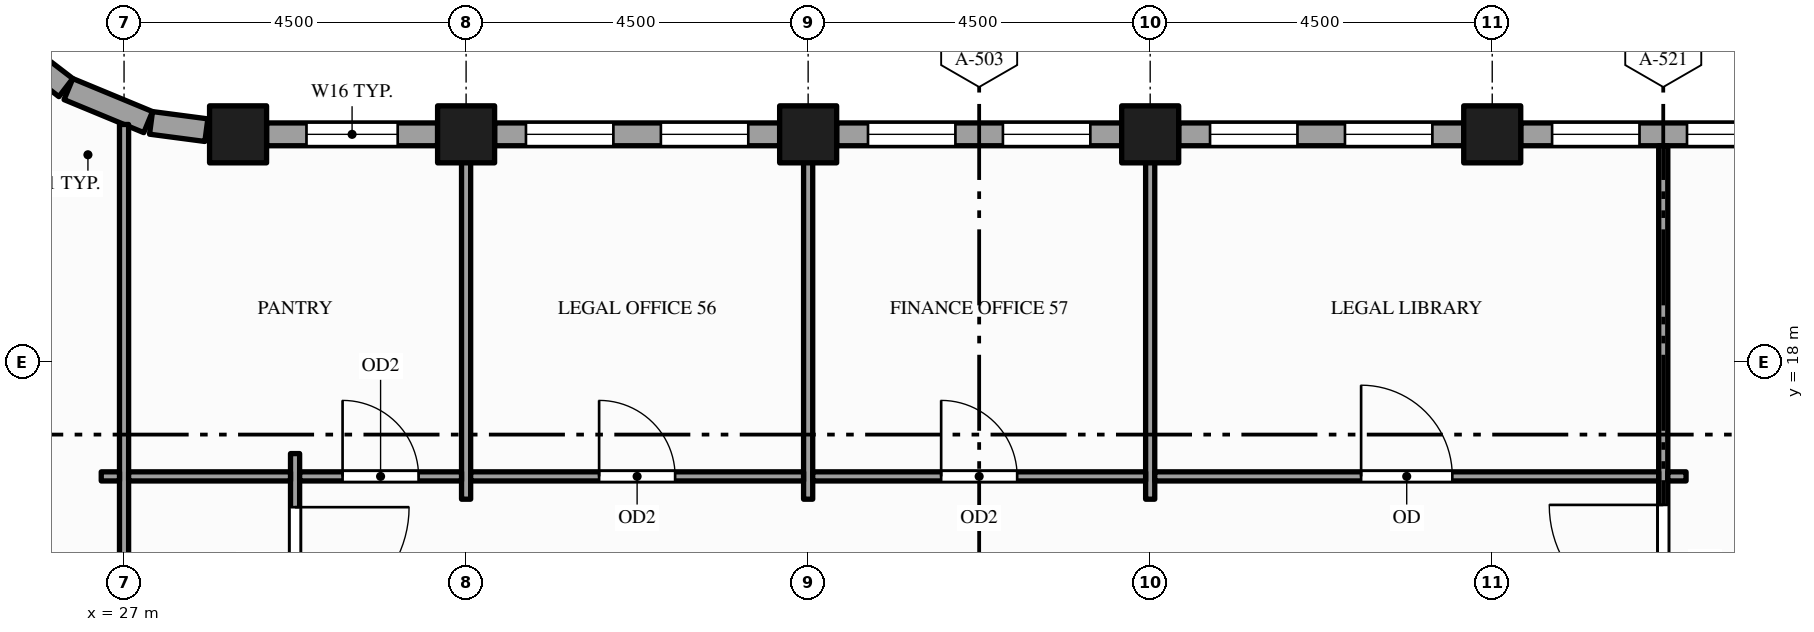
"""IFC4 building model, lengths in metres.
Left out: names, types, materials, properties, quantities, classifications, styles, units other than length and angle.
Written with IfcOpenShell. Run it as: python <this file> out.ifc"""

import sys

from ifc_helpers import new_model, si_unit, direction, frame, frame_2d, origin, origin_2d, place, context, subcontext, project, spatial, rectangle, hollow_rectangle, extrude, element, fill, save


model = new_model("IFC4")
c1 = context("Model", 3, precision=1e-05, world=origin(), true_north=direction((0.0, 1.0)))
c2 = subcontext(c1, "Body", "Model", "MODEL_VIEW")
j1 = project(units=[si_unit("LENGTHUNIT", "METRE"), si_unit("PLANEANGLEUNIT", "RADIAN")], contexts=[c1])
p1 = place(None, origin())
s1 = spatial("IfcSite", under=j1, at=p1, CompositionType="ELEMENT")
p2 = place(p1, origin())
s2 = spatial("IfcBuilding", under=s1, at=p2, CompositionType="ELEMENT")
p3 = place(p2, frame((0.0, 0.0, 227.0)))
s3 = spatial("IfcBuildingStorey", under=s2, at=p3, CompositionType="ELEMENT", Elevation=227.0)
for number, where, z_axis, x_axis in (
    (1, (28.5, 21.0, -0.15), (0.0, 0.0, 1.0), (1.0, 0.0, 0.0)),
    (2, (31.5, 21.0, -0.15), (0.0, 0.0, 1.0), (1.0, 0.0, 0.0)),
    (3, (36.0, 21.0, -0.15), (0.0, 0.0, 1.0), (1.0, 0.0, 0.0)),
    (4, (40.5, 21.0, -0.15), (0.0, 0.0, 1.0), (1.0, 0.0, 0.0)),
    (5, (45.0, 21.0, -0.15), (0.0, 0.0, 1.0), (1.0, 0.0, 0.0)),
):
    element("IfcColumn", number, at=place(p3, frame(where, z_axis=z_axis, x_axis=x_axis)), inside=s3, PredefinedType="COLUMN", context=c2, shape_type="SweptSolid", body=[
        extrude(hollow_rectangle(XDim=0.75, YDim=0.75, WallThickness=0.036, at=origin_2d()), origin(), (0.0, 0.0, 1.0), 4.0),
    ])
p4 = place(p3, frame((49.125, 21.0, 0.0), z_axis=(0.0, 0.0, 1.0), x_axis=(-1.0, 0.0, 0.0)))
e6 = element("IfcWall", 6, at=p4, inside=s3, PredefinedType="STANDARD", context=c2, shape_type="SweptSolid", body=[
    extrude(rectangle(XDim=3.75, YDim=0.3, at=frame_2d((1.875, 0.0))), origin(), (0.0, 0.0, 1.0), 2.87),
])
p5 = place(p4, frame((0.413, 0.0, 0.9)))
e7 = element("IfcOpeningElement", 7, at=p5, cuts=e6, PredefinedType="OPENING", context=c2, shape_type="SweptSolid", body=[
    extrude(rectangle(XDim=1.15, YDim=1.75, at=frame_2d((0.575, 0.875))), frame((0.0, 0.16, 0.0), z_axis=(0.0, -1.0, 0.0), x_axis=(1.0, 0.0, 0.0)), (0.0, 0.0, 1.0), 0.32),
])
p6 = place(p4, frame((2.188, 0.0, 0.9)))
e8 = element("IfcOpeningElement", 8, at=p6, cuts=e6, PredefinedType="OPENING", context=c2, shape_type="SweptSolid", body=[
    extrude(rectangle(XDim=1.15, YDim=1.75, at=frame_2d((0.575, 0.875))), frame((0.0, 0.16, 0.0), z_axis=(0.0, -1.0, 0.0), x_axis=(1.0, 0.0, 0.0)), (0.0, 0.0, 1.0), 0.32),
])
p7 = place(p3, frame((44.625, 21.0, 0.0), z_axis=(0.0, 0.0, 1.0), x_axis=(-1.0, 0.0, 0.0)))
e9 = element("IfcWall", 9, at=p7, inside=s3, PredefinedType="STANDARD", context=c2, shape_type="SweptSolid", body=[
    extrude(rectangle(XDim=3.75, YDim=0.3, at=frame_2d((1.875, 0.0))), origin(), (0.0, 0.0, 1.0), 2.87),
])
p8 = place(p7, frame((0.413, 0.0, 0.9)))
e10 = element("IfcOpeningElement", 10, at=p8, cuts=e9, PredefinedType="OPENING", context=c2, shape_type="SweptSolid", body=[
    extrude(rectangle(XDim=1.15, YDim=1.75, at=frame_2d((0.575, 0.875))), frame((0.0, 0.16, 0.0), z_axis=(0.0, -1.0, 0.0), x_axis=(1.0, 0.0, 0.0)), (0.0, 0.0, 1.0), 0.32),
])
p9 = place(p7, frame((2.188, 0.0, 0.9)))
e11 = element("IfcOpeningElement", 11, at=p9, cuts=e9, PredefinedType="OPENING", context=c2, shape_type="SweptSolid", body=[
    extrude(rectangle(XDim=1.15, YDim=1.75, at=frame_2d((0.575, 0.875))), frame((0.0, 0.16, 0.0), z_axis=(0.0, -1.0, 0.0), x_axis=(1.0, 0.0, 0.0)), (0.0, 0.0, 1.0), 0.32),
])
p10 = place(p3, frame((40.125, 21.0, 0.0), z_axis=(0.0, 0.0, 1.0), x_axis=(-1.0, 0.0, 0.0)))
e12 = element("IfcWall", 12, at=p10, inside=s3, PredefinedType="STANDARD", context=c2, shape_type="SweptSolid", body=[
    extrude(rectangle(XDim=3.75, YDim=0.3, at=frame_2d((1.875, 0.0))), origin(), (0.0, 0.0, 1.0), 2.87),
])
p11 = place(p10, frame((0.413, 0.0, 0.9)))
e13 = element("IfcOpeningElement", 13, at=p11, cuts=e12, PredefinedType="OPENING", context=c2, shape_type="SweptSolid", body=[
    extrude(rectangle(XDim=1.15, YDim=1.75, at=frame_2d((0.575, 0.875))), frame((0.0, 0.16, 0.0), z_axis=(0.0, -1.0, 0.0), x_axis=(1.0, 0.0, 0.0)), (0.0, 0.0, 1.0), 0.32),
])
p12 = place(p10, frame((2.188, 0.0, 0.9)))
e14 = element("IfcOpeningElement", 14, at=p12, cuts=e12, PredefinedType="OPENING", context=c2, shape_type="SweptSolid", body=[
    extrude(rectangle(XDim=1.15, YDim=1.75, at=frame_2d((0.575, 0.875))), frame((0.0, 0.16, 0.0), z_axis=(0.0, -1.0, 0.0), x_axis=(1.0, 0.0, 0.0)), (0.0, 0.0, 1.0), 0.32),
])
p13 = place(p3, frame((35.625, 21.0, 0.0), z_axis=(0.0, 0.0, 1.0), x_axis=(-1.0, 0.0, 0.0)))
e15 = element("IfcWall", 15, at=p13, inside=s3, PredefinedType="STANDARD", context=c2, shape_type="SweptSolid", body=[
    extrude(rectangle(XDim=3.75, YDim=0.3, at=frame_2d((1.875, 0.0))), origin(), (0.0, 0.0, 1.0), 2.87),
])
p14 = place(p13, frame((0.413, 0.0, 0.9)))
e16 = element("IfcOpeningElement", 16, at=p14, cuts=e15, PredefinedType="OPENING", context=c2, shape_type="SweptSolid", body=[
    extrude(rectangle(XDim=1.15, YDim=1.75, at=frame_2d((0.575, 0.875))), frame((0.0, 0.16, 0.0), z_axis=(0.0, -1.0, 0.0), x_axis=(1.0, 0.0, 0.0)), (0.0, 0.0, 1.0), 0.32),
])
p15 = place(p13, frame((2.188, 0.0, 0.9)))
e17 = element("IfcOpeningElement", 17, at=p15, cuts=e15, PredefinedType="OPENING", context=c2, shape_type="SweptSolid", body=[
    extrude(rectangle(XDim=1.15, YDim=1.75, at=frame_2d((0.575, 0.875))), frame((0.0, 0.16, 0.0), z_axis=(0.0, -1.0, 0.0), x_axis=(1.0, 0.0, 0.0)), (0.0, 0.0, 1.0), 0.32),
])
p16 = place(p3, frame((31.125, 21.0, 0.0), z_axis=(0.0, 0.0, 1.0), x_axis=(-1.0, 0.0, 0.0)))
e18 = element("IfcWall", 18, at=p16, inside=s3, PredefinedType="STANDARD", context=c2, shape_type="SweptSolid", body=[
    extrude(rectangle(XDim=2.25, YDim=0.3, at=frame_2d((1.125, 0.0))), origin(), (0.0, 0.0, 1.0), 2.87),
])
p17 = place(p16, frame((0.525, 0.0, 0.9)))
e19 = element("IfcOpeningElement", 19, at=p17, cuts=e18, PredefinedType="OPENING", context=c2, shape_type="SweptSolid", body=[
    extrude(rectangle(XDim=1.2, YDim=1.75, at=frame_2d((0.6, 0.875))), frame((0.0, 0.16, 0.0), z_axis=(0.0, -1.0, 0.0), x_axis=(1.0, 0.0, 0.0)), (0.0, 0.0, 1.0), 0.32),
])
p18 = place(p3, frame((28.083, 21.055, 0.0), z_axis=(0.0, 0.0, 1.0), x_axis=(-0.99142711513, 0.130660917588, 0.0)))
e20 = element("IfcWall", 20, at=p18, inside=s3, PredefinedType="STANDARD", context=c2, shape_type="SweptSolid", body=[
    extrude(rectangle(XDim=0.734, YDim=0.3, at=frame_2d((0.367, 0.0))), origin(), (0.0, 0.0, 1.0), 3.157),
])
p19 = place(p3, frame((27.317, 21.161, 0.0), z_axis=(0.0, 0.0, 1.0), x_axis=(-0.923914616768, 0.382598720491, 0.0)))
e21 = element("IfcWall", 21, at=p19, inside=s3, PredefinedType="STANDARD", context=c2, shape_type="SweptSolid", body=[
    extrude(rectangle(XDim=1.135, YDim=0.3, at=frame_2d((0.568, 0.0))), origin(), (0.0, 0.0, 1.0), 2.87),
])
p20 = place(p3, frame((26.234, 21.615, 0.0), z_axis=(0.0, 0.0, 1.0), x_axis=(-0.793575131083, 0.608472276547, 0.0)))
e22 = element("IfcWall", 22, at=p20, inside=s3, PredefinedType="STANDARD", context=c2, shape_type="SweptSolid", body=[
    extrude(rectangle(XDim=0.629, YDim=0.3, at=frame_2d((0.314, 0.0))), origin(), (0.0, 0.0, 1.0), 3.157),
])
p21 = place(p3, frame((27.0, -1.35, 0.0), z_axis=(0.0, 0.0, 1.0), x_axis=(0.0, 1.0, 0.0)))
e23 = element("IfcWall", 23, at=p21, inside=s3, PredefinedType="PARTITIONING", context=c2, shape_type="SweptSolid", body=[
    extrude(rectangle(XDim=22.48, YDim=0.12, at=frame_2d((11.24, 0.0))), origin(), (0.0, 0.0, 1.0), 2.87),
])
p22 = place(p21, frame((10.725, 0.0, 0.0)))
e24 = element("IfcOpeningElement", 24, at=p22, cuts=e23, PredefinedType="OPENING", context=c2, shape_type="SweptSolid", body=[
    extrude(rectangle(XDim=1.5, YDim=2.1, at=frame_2d((0.75, 1.05))), frame((0.0, 0.07, 0.0), z_axis=(0.0, -1.0, 0.0), x_axis=(1.0, 0.0, 0.0)), (0.0, 0.0, 1.0), 0.14),
])
p23 = place(p21, frame((14.625, 0.0, 0.0)))
e25 = element("IfcOpeningElement", 25, at=p23, cuts=e23, PredefinedType="OPENING", context=c2, shape_type="SweptSolid", body=[
    extrude(rectangle(XDim=1.2, YDim=2.1, at=frame_2d((0.6, 1.05))), frame((0.0, 0.07, 0.0), z_axis=(0.0, -1.0, 0.0), x_axis=(1.0, 0.0, 0.0)), (0.0, 0.0, 1.0), 0.14),
])
p24 = place(p3, frame((29.25, 2.7, 0.0), z_axis=(0.0, 0.0, 1.0), x_axis=(0.0, 1.0, 0.0)))
e26 = element("IfcWall", 26, at=p24, inside=s3, PredefinedType="PARTITIONING", context=c2, shape_type="SweptSolid", body=[
    extrude(rectangle(XDim=14.1, YDim=0.12, at=frame_2d((7.05, 0.0))), origin(), (0.0, 0.0, 1.0), 2.87),
])
p25 = place(p24, frame((0.705, 0.0, 0.0)))
e27 = element("IfcOpeningElement", 27, at=p25, cuts=e26, PredefinedType="OPENING", context=c2, shape_type="SweptSolid", body=[
    extrude(rectangle(XDim=1.5, YDim=2.1, at=frame_2d((0.75, 1.05))), frame((0.0, 0.07, 0.0), z_axis=(0.0, -1.0, 0.0), x_axis=(1.0, 0.0, 0.0)), (0.0, 0.0, 1.0), 0.14),
])
p26 = place(p24, frame((11.895, 0.0, 0.0)))
e28 = element("IfcOpeningElement", 28, at=p26, cuts=e26, PredefinedType="OPENING", context=c2, shape_type="SweptSolid", body=[
    extrude(rectangle(XDim=1.5, YDim=2.1, at=frame_2d((0.75, 1.05))), frame((0.0, 0.07, 0.0), z_axis=(0.0, -1.0, 0.0), x_axis=(1.0, 0.0, 0.0)), (0.0, 0.0, 1.0), 0.14),
])
for number, where, z_axis, x_axis in (
    (29, (31.5, 16.2, 0.0), (0.0, 0.0, 1.0), (0.0, 1.0, 0.0)),
    (30, (36.0, 16.2, 0.0), (0.0, 0.0, 1.0), (0.0, 1.0, 0.0)),
    (31, (40.5, 16.2, 0.0), (0.0, 0.0, 1.0), (0.0, 1.0, 0.0)),
):
    element("IfcWall", number, at=place(p3, frame(where, z_axis=z_axis, x_axis=x_axis)), inside=s3, PredefinedType="PARTITIONING", context=c2, shape_type="SweptSolid", body=[
        extrude(rectangle(XDim=4.65, YDim=0.12, at=frame_2d((2.325, 0.0))), origin(), (0.0, 0.0, 1.0), 2.87),
    ])
p27 = place(p3, frame((47.25, -1.35, 0.0), z_axis=(0.0, 0.0, 1.0), x_axis=(0.0, 1.0, 0.0)))
e32 = element("IfcWall", 32, at=p27, inside=s3, PredefinedType="PARTITIONING", context=c2, shape_type="SweptSolid", body=[
    extrude(rectangle(XDim=22.2, YDim=0.12, at=frame_2d((11.1, 0.0))), origin(), (0.0, 0.0, 1.0), 2.87),
])
p28 = place(p27, frame((4.725, 0.0, 0.0)))
e33 = element("IfcOpeningElement", 33, at=p28, cuts=e32, PredefinedType="OPENING", context=c2, shape_type="SweptSolid", body=[
    extrude(rectangle(XDim=1.5, YDim=2.1, at=frame_2d((0.75, 1.05))), frame((0.0, 0.07, 0.0), z_axis=(0.0, -1.0, 0.0), x_axis=(1.0, 0.0, 0.0)), (0.0, 0.0, 1.0), 0.14),
])
p29 = place(p27, frame((15.975, 0.0, 0.0)))
e34 = element("IfcOpeningElement", 34, at=p29, cuts=e32, PredefinedType="OPENING", context=c2, shape_type="SweptSolid", body=[
    extrude(rectangle(XDim=1.5, YDim=2.1, at=frame_2d((0.75, 1.05))), frame((0.0, 0.07, 0.0), z_axis=(0.0, -1.0, 0.0), x_axis=(1.0, 0.0, 0.0)), (0.0, 0.0, 1.0), 0.14),
])
p30 = place(p27, frame((7.6, 0.0, 0.0)))
e35 = element("IfcOpeningElement", 35, at=p30, cuts=e32, PredefinedType="OPENING", context=c2, shape_type="SweptSolid", body=[
    extrude(rectangle(XDim=0.9, YDim=2.1, at=frame_2d((0.45, 1.05))), frame((0.0, 0.07, 0.0), z_axis=(0.0, -1.0, 0.0), x_axis=(1.0, 0.0, 0.0)), (0.0, 0.0, 1.0), 0.14),
])
p31 = place(p27, frame((10.65, 0.0, 0.0)))
e36 = element("IfcOpeningElement", 36, at=p31, cuts=e32, PredefinedType="OPENING", context=c2, shape_type="SweptSolid", body=[
    extrude(rectangle(XDim=0.9, YDim=2.1, at=frame_2d((0.45, 1.05))), frame((0.0, 0.07, 0.0), z_axis=(0.0, -1.0, 0.0), x_axis=(1.0, 0.0, 0.0)), (0.0, 0.0, 1.0), 0.14),
])
p32 = place(p27, frame((13.6, 0.0, 0.0)))
e37 = element("IfcOpeningElement", 37, at=p32, cuts=e32, PredefinedType="OPENING", context=c2, shape_type="SweptSolid", body=[
    extrude(rectangle(XDim=1.0, YDim=2.1, at=frame_2d((0.5, 1.05))), frame((0.0, 0.07, 0.0), z_axis=(0.0, -1.0, 0.0), x_axis=(1.0, 0.0, 0.0)), (0.0, 0.0, 1.0), 0.14),
])
p33 = place(p3, frame((26.7, 16.5, 0.0), z_axis=(0.0, 0.0, 1.0), x_axis=(1.0, 0.0, 0.0)))
e38 = element("IfcWall", 38, at=p33, inside=s3, PredefinedType="PARTITIONING", context=c2, shape_type="SweptSolid", body=[
    extrude(rectangle(XDim=0.24, YDim=0.12, at=frame_2d((0.12, 0.0))), origin(), (0.0, 0.0, 1.0), 2.87),
])
p34 = place(p3, frame((27.06, 16.5, 0.0), z_axis=(0.0, 0.0, 1.0), x_axis=(1.0, 0.0, 0.0)))
e39 = element("IfcWall", 39, at=p34, inside=s3, PredefinedType="PARTITIONING", context=c2, shape_type="SweptSolid", body=[
    extrude(rectangle(XDim=2.13, YDim=0.12, at=frame_2d((1.065, 0.0))), origin(), (0.0, 0.0, 1.0), 2.87),
])
p35 = place(p3, frame((29.31, 16.5, 0.0), z_axis=(0.0, 0.0, 1.0), x_axis=(1.0, 0.0, 0.0)))
e40 = element("IfcWall", 40, at=p35, inside=s3, PredefinedType="PARTITIONING", context=c2, shape_type="SweptSolid", body=[
    extrude(rectangle(XDim=2.13, YDim=0.12, at=frame_2d((1.065, 0.0))), origin(), (0.0, 0.0, 1.0), 2.87),
])
p36 = place(p35, frame((0.565, 0.0, 0.0)))
e41 = element("IfcOpeningElement", 41, at=p36, cuts=e40, PredefinedType="OPENING", context=c2, shape_type="SweptSolid", body=[
    extrude(rectangle(XDim=1.0, YDim=2.1, at=frame_2d((0.5, 1.05))), frame((0.0, 0.07, 0.0), z_axis=(0.0, -1.0, 0.0), x_axis=(1.0, 0.0, 0.0)), (0.0, 0.0, 1.0), 0.14),
])
p37 = place(p3, frame((31.56, 16.5, 0.0), z_axis=(0.0, 0.0, 1.0), x_axis=(1.0, 0.0, 0.0)))
e42 = element("IfcWall", 42, at=p37, inside=s3, PredefinedType="PARTITIONING", context=c2, shape_type="SweptSolid", body=[
    extrude(rectangle(XDim=4.38, YDim=0.12, at=frame_2d((2.19, 0.0))), origin(), (0.0, 0.0, 1.0), 2.87),
])
p38 = place(p37, frame((1.69, 0.0, 0.0)))
e43 = element("IfcOpeningElement", 43, at=p38, cuts=e42, PredefinedType="OPENING", context=c2, shape_type="SweptSolid", body=[
    extrude(rectangle(XDim=1.0, YDim=2.1, at=frame_2d((0.5, 1.05))), frame((0.0, 0.07, 0.0), z_axis=(0.0, -1.0, 0.0), x_axis=(1.0, 0.0, 0.0)), (0.0, 0.0, 1.0), 0.14),
])
p39 = place(p3, frame((36.06, 16.5, 0.0), z_axis=(0.0, 0.0, 1.0), x_axis=(1.0, 0.0, 0.0)))
e44 = element("IfcWall", 44, at=p39, inside=s3, PredefinedType="PARTITIONING", context=c2, shape_type="SweptSolid", body=[
    extrude(rectangle(XDim=4.38, YDim=0.12, at=frame_2d((2.19, 0.0))), origin(), (0.0, 0.0, 1.0), 2.87),
])
p40 = place(p39, frame((1.69, 0.0, 0.0)))
e45 = element("IfcOpeningElement", 45, at=p40, cuts=e44, PredefinedType="OPENING", context=c2, shape_type="SweptSolid", body=[
    extrude(rectangle(XDim=1.0, YDim=2.1, at=frame_2d((0.5, 1.05))), frame((0.0, 0.07, 0.0), z_axis=(0.0, -1.0, 0.0), x_axis=(1.0, 0.0, 0.0)), (0.0, 0.0, 1.0), 0.14),
])
p41 = place(p3, frame((40.56, 16.5, 0.0), z_axis=(0.0, 0.0, 1.0), x_axis=(1.0, 0.0, 0.0)))
e46 = element("IfcWall", 46, at=p41, inside=s3, PredefinedType="PARTITIONING", context=c2, shape_type="SweptSolid", body=[
    extrude(rectangle(XDim=6.63, YDim=0.12, at=frame_2d((3.315, 0.0))), origin(), (0.0, 0.0, 1.0), 2.87),
])
p42 = place(p41, frame((2.715, 0.0, 0.0)))
e47 = element("IfcOpeningElement", 47, at=p42, cuts=e46, PredefinedType="OPENING", context=c2, shape_type="SweptSolid", body=[
    extrude(rectangle(XDim=1.2, YDim=2.1, at=frame_2d((0.6, 1.05))), frame((0.0, 0.07, 0.0), z_axis=(0.0, -1.0, 0.0), x_axis=(1.0, 0.0, 0.0)), (0.0, 0.0, 1.0), 0.14),
])
p43 = place(p3, frame((47.31, 16.5, 0.0), z_axis=(0.0, 0.0, 1.0), x_axis=(1.0, 0.0, 0.0)))
e48 = element("IfcWall", 48, at=p43, inside=s3, PredefinedType="PARTITIONING", context=c2, shape_type="SweptSolid", body=[
    extrude(rectangle(XDim=0.24, YDim=0.12, at=frame_2d((0.12, 0.0))), origin(), (0.0, 0.0, 1.0), 2.87),
])
p44 = place(p5, origin())
e49 = element("IfcWindow", 49, at=p44, inside=s3, PartitioningType="SINGLE_PANEL", PredefinedType="WINDOW", context=c2, shape_type="SweptSolid", body=[
    extrude(rectangle(XDim=1.15, YDim=1.75, at=frame_2d((0.575, 0.875))), frame((0.0, 0.03, 0.0), z_axis=(0.0, -1.0, 0.0), x_axis=(1.0, 0.0, 0.0)), (0.0, 0.0, 1.0), 0.06),
])
fill(e7, e49)
p45 = place(p6, origin())
e50 = element("IfcWindow", 50, at=p45, inside=s3, PartitioningType="SINGLE_PANEL", PredefinedType="WINDOW", context=c2, shape_type="SweptSolid", body=[
    extrude(rectangle(XDim=1.15, YDim=1.75, at=frame_2d((0.575, 0.875))), frame((0.0, 0.03, 0.0), z_axis=(0.0, -1.0, 0.0), x_axis=(1.0, 0.0, 0.0)), (0.0, 0.0, 1.0), 0.06),
])
fill(e8, e50)
p46 = place(p8, origin())
e51 = element("IfcWindow", 51, at=p46, inside=s3, PartitioningType="SINGLE_PANEL", PredefinedType="WINDOW", context=c2, shape_type="SweptSolid", body=[
    extrude(rectangle(XDim=1.15, YDim=1.75, at=frame_2d((0.575, 0.875))), frame((0.0, 0.03, 0.0), z_axis=(0.0, -1.0, 0.0), x_axis=(1.0, 0.0, 0.0)), (0.0, 0.0, 1.0), 0.06),
])
fill(e10, e51)
p47 = place(p9, origin())
e52 = element("IfcWindow", 52, at=p47, inside=s3, PartitioningType="SINGLE_PANEL", PredefinedType="WINDOW", context=c2, shape_type="SweptSolid", body=[
    extrude(rectangle(XDim=1.15, YDim=1.75, at=frame_2d((0.575, 0.875))), frame((0.0, 0.03, 0.0), z_axis=(0.0, -1.0, 0.0), x_axis=(1.0, 0.0, 0.0)), (0.0, 0.0, 1.0), 0.06),
])
fill(e11, e52)
p48 = place(p11, origin())
e53 = element("IfcWindow", 53, at=p48, inside=s3, PartitioningType="SINGLE_PANEL", PredefinedType="WINDOW", context=c2, shape_type="SweptSolid", body=[
    extrude(rectangle(XDim=1.15, YDim=1.75, at=frame_2d((0.575, 0.875))), frame((0.0, 0.03, 0.0), z_axis=(0.0, -1.0, 0.0), x_axis=(1.0, 0.0, 0.0)), (0.0, 0.0, 1.0), 0.06),
])
fill(e13, e53)
p49 = place(p12, origin())
e54 = element("IfcWindow", 54, at=p49, inside=s3, PartitioningType="SINGLE_PANEL", PredefinedType="WINDOW", context=c2, shape_type="SweptSolid", body=[
    extrude(rectangle(XDim=1.15, YDim=1.75, at=frame_2d((0.575, 0.875))), frame((0.0, 0.03, 0.0), z_axis=(0.0, -1.0, 0.0), x_axis=(1.0, 0.0, 0.0)), (0.0, 0.0, 1.0), 0.06),
])
fill(e14, e54)
p50 = place(p14, origin())
e55 = element("IfcWindow", 55, at=p50, inside=s3, PartitioningType="SINGLE_PANEL", PredefinedType="WINDOW", context=c2, shape_type="SweptSolid", body=[
    extrude(rectangle(XDim=1.15, YDim=1.75, at=frame_2d((0.575, 0.875))), frame((0.0, 0.03, 0.0), z_axis=(0.0, -1.0, 0.0), x_axis=(1.0, 0.0, 0.0)), (0.0, 0.0, 1.0), 0.06),
])
fill(e16, e55)
p51 = place(p15, origin())
e56 = element("IfcWindow", 56, at=p51, inside=s3, PartitioningType="SINGLE_PANEL", PredefinedType="WINDOW", context=c2, shape_type="SweptSolid", body=[
    extrude(rectangle(XDim=1.15, YDim=1.75, at=frame_2d((0.575, 0.875))), frame((0.0, 0.03, 0.0), z_axis=(0.0, -1.0, 0.0), x_axis=(1.0, 0.0, 0.0)), (0.0, 0.0, 1.0), 0.06),
])
fill(e17, e56)
p52 = place(p17, origin())
e57 = element("IfcWindow", 57, at=p52, inside=s3, PartitioningType="SINGLE_PANEL", PredefinedType="WINDOW", context=c2, shape_type="SweptSolid", body=[
    extrude(rectangle(XDim=1.2, YDim=1.75, at=frame_2d((0.6, 0.875))), frame((0.0, 0.03, 0.0), z_axis=(0.0, -1.0, 0.0), x_axis=(1.0, 0.0, 0.0)), (0.0, 0.0, 1.0), 0.06),
])
fill(e19, e57)
p53 = place(p26, origin())
e58 = element("IfcDoor", 58, at=p53, inside=s3, OperationType="SINGLE_SWING_RIGHT", PredefinedType="DOOR", context=c2, shape_type="SweptSolid", body=[
    extrude(rectangle(XDim=1.5, YDim=2.1, at=frame_2d((0.75, 1.05))), frame((0.0, 0.025, 0.0), z_axis=(0.0, -1.0, 0.0), x_axis=(1.0, 0.0, 0.0)), (0.0, 0.0, 1.0), 0.05),
])
fill(e28, e58)
p54 = place(p29, origin())
e59 = element("IfcDoor", 59, at=p54, inside=s3, OperationType="SINGLE_SWING_RIGHT", PredefinedType="DOOR", context=c2, shape_type="SweptSolid", body=[
    extrude(rectangle(XDim=1.5, YDim=2.1, at=frame_2d((0.75, 1.05))), frame((0.0, 0.025, 0.0), z_axis=(0.0, -1.0, 0.0), x_axis=(1.0, 0.0, 0.0)), (0.0, 0.0, 1.0), 0.05),
])
fill(e34, e59)
p55 = place(p36, origin())
e60 = element("IfcDoor", 60, at=p55, inside=s3, OperationType="SINGLE_SWING_LEFT", PredefinedType="DOOR", context=c2, shape_type="SweptSolid", body=[
    extrude(rectangle(XDim=1.0, YDim=2.1, at=frame_2d((0.5, 1.05))), frame((0.0, 0.025, 0.0), z_axis=(0.0, -1.0, 0.0), x_axis=(1.0, 0.0, 0.0)), (0.0, 0.0, 1.0), 0.05),
])
fill(e41, e60)
p56 = place(p38, origin())
e61 = element("IfcDoor", 61, at=p56, inside=s3, OperationType="SINGLE_SWING_LEFT", PredefinedType="DOOR", context=c2, shape_type="SweptSolid", body=[
    extrude(rectangle(XDim=1.0, YDim=2.1, at=frame_2d((0.5, 1.05))), frame((0.0, 0.025, 0.0), z_axis=(0.0, -1.0, 0.0), x_axis=(1.0, 0.0, 0.0)), (0.0, 0.0, 1.0), 0.05),
])
fill(e43, e61)
p57 = place(p40, origin())
e62 = element("IfcDoor", 62, at=p57, inside=s3, OperationType="SINGLE_SWING_LEFT", PredefinedType="DOOR", context=c2, shape_type="SweptSolid", body=[
    extrude(rectangle(XDim=1.0, YDim=2.1, at=frame_2d((0.5, 1.05))), frame((0.0, 0.025, 0.0), z_axis=(0.0, -1.0, 0.0), x_axis=(1.0, 0.0, 0.0)), (0.0, 0.0, 1.0), 0.05),
])
fill(e45, e62)
p58 = place(p42, origin())
e63 = element("IfcDoor", 63, at=p58, inside=s3, OperationType="SINGLE_SWING_LEFT", PredefinedType="DOOR", context=c2, shape_type="SweptSolid", body=[
    extrude(rectangle(XDim=1.2, YDim=2.1, at=frame_2d((0.6, 1.05))), frame((0.0, 0.025, 0.0), z_axis=(0.0, -1.0, 0.0), x_axis=(1.0, 0.0, 0.0)), (0.0, 0.0, 1.0), 0.05),
])
fill(e47, e63)
save(model, sys.argv[1])
